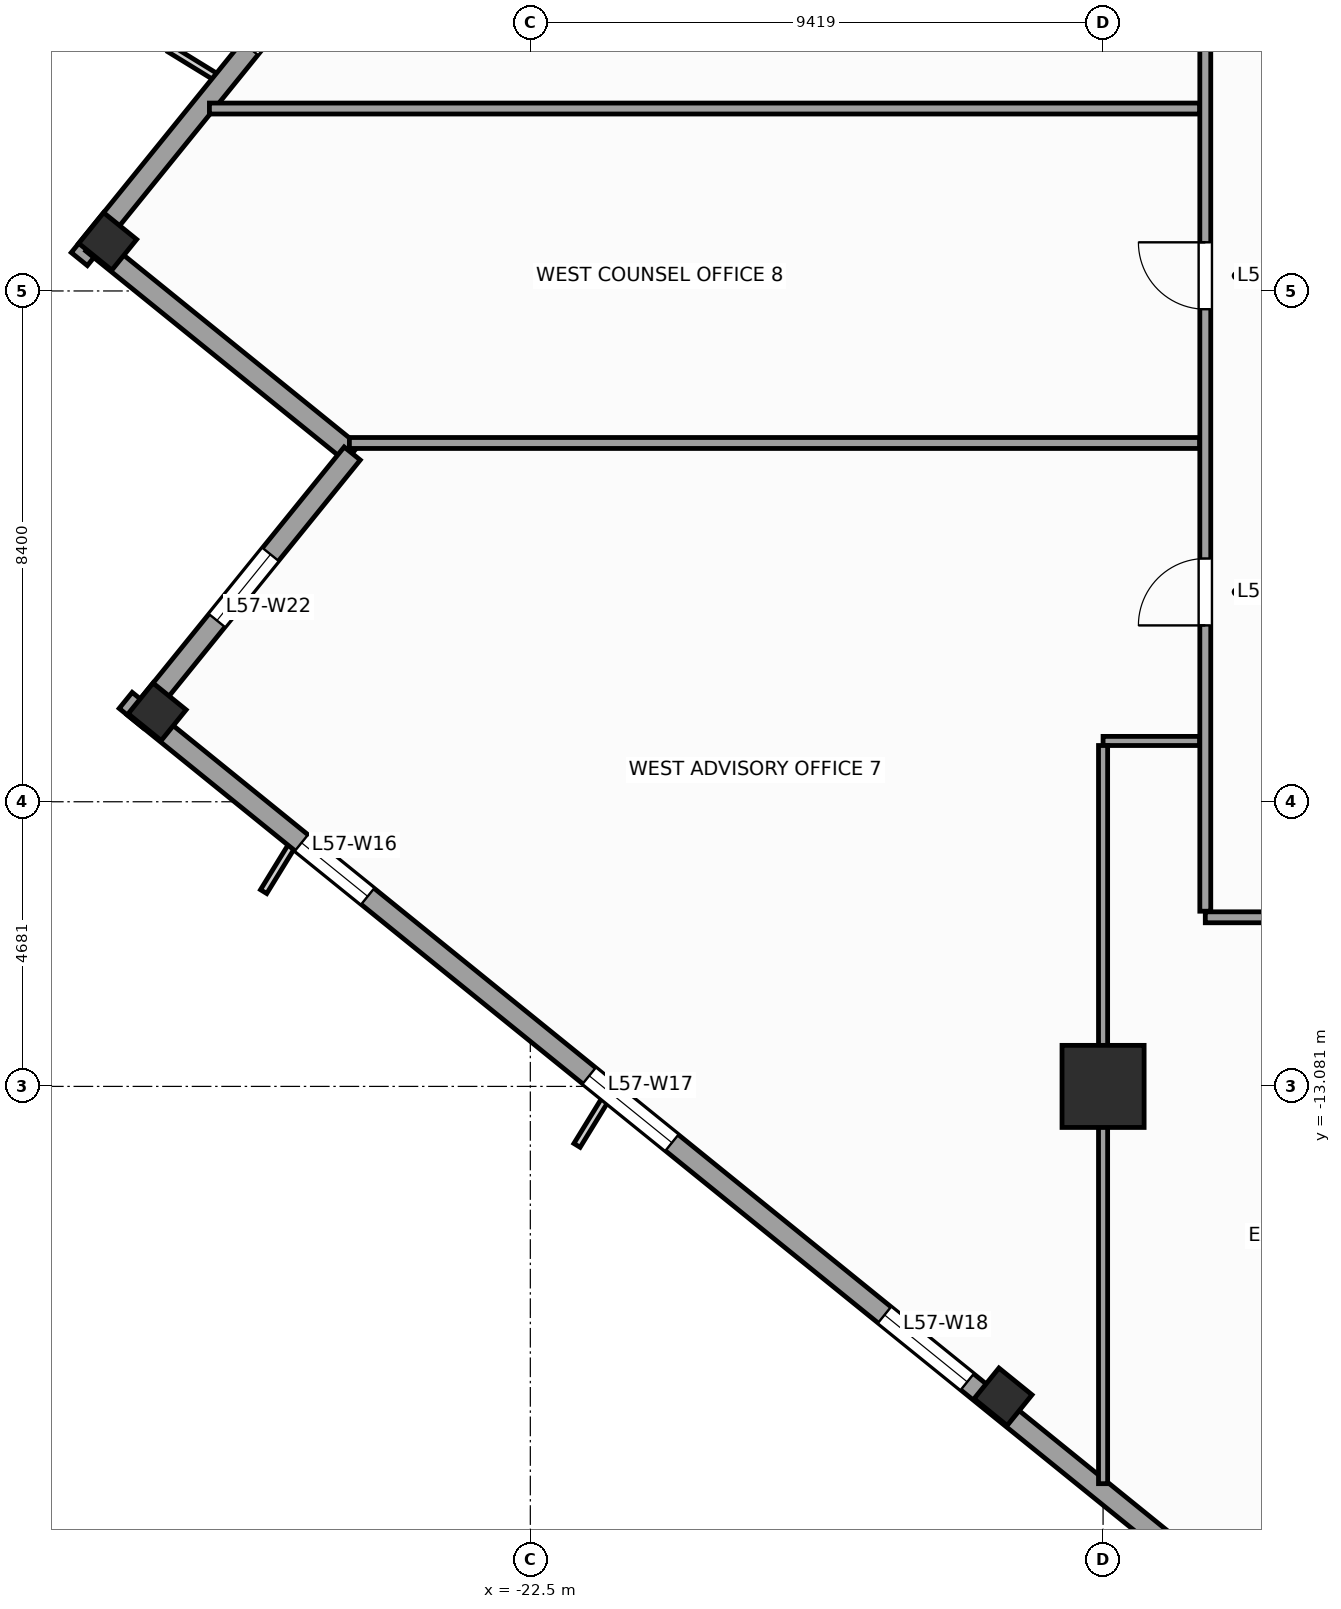
"""IFC4 building model, lengths in metres.
Left out: names, types, materials, properties, quantities, classifications, styles, units other than length and angle.
Written with IfcOpenShell. Run it as: python <this file> out.ifc"""

import sys

from ifc_helpers import new_model, si_unit, direction, frame, frame_2d, origin, origin_2d, place, context, subcontext, project, spatial, rectangle, extrude, source, transform, mapped, element, fill, save


model = new_model("IFC4")
c1 = context("Model", 3, precision=1e-05, world=origin(), true_north=direction((0.0, 1.0)))
c2 = subcontext(c1, "Body", "Model", "MODEL_VIEW")
j1 = project(units=[si_unit("LENGTHUNIT", "METRE"), si_unit("PLANEANGLEUNIT", "RADIAN")], contexts=[c1])
p1 = place(None, origin())
s1 = spatial("IfcSite", under=j1, at=p1, CompositionType="ELEMENT")
p2 = place(p1, origin())
s2 = spatial("IfcBuilding", under=s1, at=p2, CompositionType="ELEMENT")
p3 = place(p2, frame((0.0, 0.0, 236.8)))
s3 = spatial("IfcBuildingStorey", under=s2, at=p3, CompositionType="ELEMENT", Elevation=236.8)
m1 = source(origin(), c2, "Body", "SweptSolid", [
    extrude(rectangle(XDim=1.35, YDim=1.35, at=origin_2d()), origin(), (0.0, 0.0, 1.0), 3.9),
])
p4 = place(p3, frame((-13.081, -13.081, 0.0), z_axis=(0.0, 0.0, 1.0), x_axis=(1.0, 0.0, 0.0)))
e1 = element("IfcColumn", 1, at=p4, inside=s3, PredefinedType="COLUMN", context=c2, shape_type="MappedRepresentation", body=[
    mapped(m1, transform((0.0, 0.0, 0.0), scale=1.0)),
])
m2 = source(origin(), c2, "Body", "SweptSolid", [
    extrude(rectangle(XDim=0.65, YDim=0.7, at=origin_2d()), origin(), (0.0, 0.0, 1.0), 3.9),
])
for number, where, z_axis, x_axis in (
    (2, (-29.45, 0.815, 0.0), (0.0, 0.0, 1.0), (0.629, 0.777, 0.0)),
    (3, (-28.637, -6.92, 0.0), (0.0, 0.0, 1.0), (0.629, 0.777, 0.0)),
    (4, (-14.726, -18.185, 0.0), (0.0, 0.0, 1.0), (0.629, 0.777, 0.0)),
):
    element("IfcColumn", number, at=place(p3, frame(where, z_axis=z_axis, x_axis=x_axis)), inside=s3, PredefinedType="COLUMN", context=c2, shape_type="MappedRepresentation", body=[
        mapped(m2, transform((0.0, 0.0, 0.0), scale=1.0)),
    ])
p5 = place(p3, frame((-6.733, 29.154, 0.0), z_axis=(0.0, 0.0, 1.0), x_axis=(-0.629325378072, -0.77714192302, 0.0)))
e5 = element("IfcWall", 5, at=p5, inside=s3, PredefinedType="STANDARD", context=c2, shape_type="SweptSolid", body=[
    extrude(rectangle(XDim=36.84, YDim=0.34, at=frame_2d((18.42, 0.0))), origin(), (0.0, 0.0, 1.0), 2.96),
])
p6 = place(p5, frame((12.295, 0.0, 0.0)))
e6 = element("IfcOpeningElement", 6, at=p6, cuts=e5, PredefinedType="OPENING", context=c2, shape_type="SweptSolid", body=[
    extrude(rectangle(XDim=1.05, YDim=2.25, at=frame_2d((0.525, 1.125))), frame((0.0, 0.18, 0.0), z_axis=(0.0, -1.0, 0.0), x_axis=(1.0, 0.0, 0.0)), (0.0, 0.0, 1.0), 0.36),
])
p7 = place(p5, frame((3.721, 0.0, 0.48)))
e7 = element("IfcOpeningElement", 7, at=p7, cuts=e5, PredefinedType="OPENING", context=c2, shape_type="SweptSolid", body=[
    extrude(rectangle(XDim=1.4, YDim=2.4, at=frame_2d((0.7, 1.2))), frame((0.0, 0.18, 0.0), z_axis=(0.0, -1.0, 0.0), x_axis=(1.0, 0.0, 0.0)), (0.0, 0.0, 1.0), 0.36),
])
p8 = place(p5, frame((7.559, 0.0, 0.58)))
e8 = element("IfcOpeningElement", 8, at=p8, cuts=e5, PredefinedType="OPENING", context=c2, shape_type="SweptSolid", body=[
    extrude(rectangle(XDim=1.75, YDim=2.3, at=frame_2d((0.875, 1.15))), frame((0.0, 0.18, 0.0), z_axis=(0.0, -1.0, 0.0), x_axis=(1.0, 0.0, 0.0)), (0.0, 0.0, 1.0), 0.36),
])
p9 = place(p5, frame((16.058, 0.0, 0.58)))
e9 = element("IfcOpeningElement", 9, at=p9, cuts=e5, PredefinedType="OPENING", context=c2, shape_type="SweptSolid", body=[
    extrude(rectangle(XDim=1.75, YDim=2.3, at=frame_2d((0.875, 1.15))), frame((0.0, 0.18, 0.0), z_axis=(0.0, -1.0, 0.0), x_axis=(1.0, 0.0, 0.0)), (0.0, 0.0, 1.0), 0.36),
])
p10 = place(p5, frame((24.176, 0.0, 0.58)))
e10 = element("IfcOpeningElement", 10, at=p10, cuts=e5, PredefinedType="OPENING", context=c2, shape_type="SweptSolid", body=[
    extrude(rectangle(XDim=1.75, YDim=2.3, at=frame_2d((0.875, 1.15))), frame((0.0, 0.18, 0.0), z_axis=(0.0, -1.0, 0.0), x_axis=(1.0, 0.0, 0.0)), (0.0, 0.0, 1.0), 0.36),
])
p11 = place(p5, frame((30.982, 0.0, 0.48)))
e11 = element("IfcOpeningElement", 11, at=p11, cuts=e5, PredefinedType="OPENING", context=c2, shape_type="SweptSolid", body=[
    extrude(rectangle(XDim=1.4, YDim=2.4, at=frame_2d((0.7, 1.2))), frame((0.0, 0.18, 0.0), z_axis=(0.0, -1.0, 0.0), x_axis=(1.0, 0.0, 0.0)), (0.0, 0.0, 1.0), 0.36),
])
p12 = place(p3, frame((-29.703, 0.789, 0.0), z_axis=(0.0, 0.0, 1.0), x_axis=(0.77714355312, -0.629323365087, 0.0)))
e12 = element("IfcWall", 12, at=p12, inside=s3, PredefinedType="STANDARD", context=c2, shape_type="SweptSolid", body=[
    extrude(rectangle(XDim=5.5, YDim=0.34, at=frame_2d((2.75, 0.0))), origin(), (0.0, 0.0, 1.0), 3.66),
])
p13 = place(p3, frame((-25.429, -2.673, 0.0), z_axis=(0.0, 0.0, 1.0), x_axis=(-0.629299794138, -0.777162640055, 0.0)))
e13 = element("IfcWall", 13, at=p13, inside=s3, PredefinedType="STANDARD", context=c2, shape_type="SweptSolid", body=[
    extrude(rectangle(XDim=5.67, YDim=0.34, at=frame_2d((2.835, 0.0))), origin(), (0.0, 0.0, 1.0), 3.66),
])
p14 = place(p13, frame((2.135, 0.0, 0.48)))
e14 = element("IfcOpeningElement", 14, at=p14, cuts=e13, PredefinedType="OPENING", context=c2, shape_type="SweptSolid", body=[
    extrude(rectangle(XDim=1.4, YDim=2.4, at=frame_2d((0.7, 1.2))), frame((0.0, 0.18, 0.0), z_axis=(0.0, -1.0, 0.0), x_axis=(1.0, 0.0, 0.0)), (0.0, 0.0, 1.0), 0.36),
])
p15 = place(p3, frame((-29.154, -6.733, 0.0), z_axis=(0.0, 0.0, 1.0), x_axis=(0.77714192302, -0.629325378072, 0.0)))
e15 = element("IfcWall", 15, at=p15, inside=s3, PredefinedType="STANDARD", context=c2, shape_type="SweptSolid", body=[
    extrude(rectangle(XDim=36.84, YDim=0.34, at=frame_2d((18.42, 0.0))), origin(), (0.0, 0.0, 1.0), 2.96),
])
p16 = place(p15, frame((3.721, 0.0, 0.48)))
e16 = element("IfcOpeningElement", 16, at=p16, cuts=e15, PredefinedType="OPENING", context=c2, shape_type="SweptSolid", body=[
    extrude(rectangle(XDim=1.4, YDim=2.4, at=frame_2d((0.7, 1.2))), frame((0.0, 0.18, 0.0), z_axis=(0.0, -1.0, 0.0), x_axis=(1.0, 0.0, 0.0)), (0.0, 0.0, 1.0), 0.36),
])
p17 = place(p15, frame((9.809, 0.0, 0.58)))
e17 = element("IfcOpeningElement", 17, at=p17, cuts=e15, PredefinedType="OPENING", context=c2, shape_type="SweptSolid", body=[
    extrude(rectangle(XDim=1.75, YDim=2.3, at=frame_2d((0.875, 1.15))), frame((0.0, 0.18, 0.0), z_axis=(0.0, -1.0, 0.0), x_axis=(1.0, 0.0, 0.0)), (0.0, 0.0, 1.0), 0.36),
])
p18 = place(p15, frame((16.058, 0.0, 0.58)))
e18 = element("IfcOpeningElement", 18, at=p18, cuts=e15, PredefinedType="OPENING", context=c2, shape_type="SweptSolid", body=[
    extrude(rectangle(XDim=1.75, YDim=2.3, at=frame_2d((0.875, 1.15))), frame((0.0, 0.18, 0.0), z_axis=(0.0, -1.0, 0.0), x_axis=(1.0, 0.0, 0.0)), (0.0, 0.0, 1.0), 0.36),
])
p19 = place(p15, frame((24.176, 0.0, 0.58)))
e19 = element("IfcOpeningElement", 19, at=p19, cuts=e15, PredefinedType="OPENING", context=c2, shape_type="SweptSolid", body=[
    extrude(rectangle(XDim=1.75, YDim=2.3, at=frame_2d((0.875, 1.15))), frame((0.0, 0.18, 0.0), z_axis=(0.0, -1.0, 0.0), x_axis=(1.0, 0.0, 0.0)), (0.0, 0.0, 1.0), 0.36),
])
p20 = place(p15, frame((32.482, 0.0, 0.48)))
e20 = element("IfcOpeningElement", 20, at=p20, cuts=e15, PredefinedType="OPENING", context=c2, shape_type="SweptSolid", body=[
    extrude(rectangle(XDim=1.4, YDim=2.4, at=frame_2d((0.7, 1.2))), frame((0.0, 0.18, 0.0), z_axis=(0.0, -1.0, 0.0), x_axis=(1.0, 0.0, 0.0)), (0.0, 0.0, 1.0), 0.36),
])
p21 = place(p3, frame((-11.4, -10.3, 0.0), z_axis=(0.0, 0.0, 1.0), x_axis=(1.0, 0.0, 0.0)))
e21 = element("IfcWall", 21, at=p21, inside=s3, PredefinedType="PARTITIONING", context=c2, shape_type="SweptSolid", body=[
    extrude(rectangle(XDim=21.7, YDim=0.18, at=frame_2d((10.85, 0.0))), origin(), (0.0, 0.0, 1.0), 3.66),
])
p22 = place(p21, frame((12.989, 0.0, 0.0)))
e22 = element("IfcOpeningElement", 22, at=p22, cuts=e21, PredefinedType="OPENING", context=c2, shape_type="SweptSolid", body=[
    extrude(rectangle(XDim=0.95, YDim=2.1, at=frame_2d((0.475, 1.05))), frame((0.0, 0.1, 0.0), z_axis=(0.0, -1.0, 0.0), x_axis=(1.0, 0.0, 0.0)), (0.0, 0.0, 1.0), 0.2),
])
p23 = place(p21, frame((17.585, 0.0, 0.0)))
e23 = element("IfcOpeningElement", 23, at=p23, cuts=e21, PredefinedType="OPENING", context=c2, shape_type="SweptSolid", body=[
    extrude(rectangle(XDim=1.1, YDim=2.2, at=frame_2d((0.55, 1.1))), frame((0.0, 0.1, 0.0), z_axis=(0.0, -1.0, 0.0), x_axis=(1.0, 0.0, 0.0)), (0.0, 0.0, 1.0), 0.2),
])
p24 = place(p21, frame((9.075, 0.0, 0.0)))
e24 = element("IfcOpeningElement", 24, at=p24, cuts=e21, PredefinedType="OPENING", context=c2, shape_type="SweptSolid", body=[
    extrude(rectangle(XDim=1.1, YDim=2.2, at=frame_2d((0.55, 1.1))), frame((0.0, 0.1, 0.0), z_axis=(0.0, -1.0, 0.0), x_axis=(1.0, 0.0, 0.0)), (0.0, 0.0, 1.0), 0.2),
])
p25 = place(p21, frame((3.724, 0.0, 0.0)))
e25 = element("IfcOpeningElement", 25, at=p25, cuts=e21, PredefinedType="OPENING", context=c2, shape_type="SweptSolid", body=[
    extrude(rectangle(XDim=1.1, YDim=2.2, at=frame_2d((0.55, 1.1))), frame((0.0, 0.1, 0.0), z_axis=(0.0, -1.0, 0.0), x_axis=(1.0, 0.0, 0.0)), (0.0, 0.0, 1.0), 0.2),
])
p26 = place(p3, frame((-11.4, -10.2, 0.0), z_axis=(0.0, 0.0, 1.0), x_axis=(0.0, 1.0, 0.0)))
e26 = element("IfcWall", 26, at=p26, inside=s3, PredefinedType="PARTITIONING", context=c2, shape_type="SweptSolid", body=[
    extrude(rectangle(XDim=20.4, YDim=0.18, at=frame_2d((10.2, 0.0))), origin(), (0.0, 0.0, 1.0), 3.66),
])
p27 = place(p26, frame((14.85, 0.0, 0.0)))
e27 = element("IfcOpeningElement", 27, at=p27, cuts=e26, PredefinedType="OPENING", context=c2, shape_type="SweptSolid", body=[
    extrude(rectangle(XDim=1.1, YDim=2.2, at=frame_2d((0.55, 1.1))), frame((0.0, 0.1, 0.0), z_axis=(0.0, -1.0, 0.0), x_axis=(1.0, 0.0, 0.0)), (0.0, 0.0, 1.0), 0.2),
])
p28 = place(p26, frame((4.7, 0.0, 0.0)))
e28 = element("IfcOpeningElement", 28, at=p28, cuts=e26, PredefinedType="OPENING", context=c2, shape_type="SweptSolid", body=[
    extrude(rectangle(XDim=1.1, YDim=2.2, at=frame_2d((0.55, 1.1))), frame((0.0, 0.1, 0.0), z_axis=(0.0, -1.0, 0.0), x_axis=(1.0, 0.0, 0.0)), (0.0, 0.0, 1.0), 0.2),
])
p29 = place(p26, frame((9.9, 0.0, 0.0)))
e29 = element("IfcOpeningElement", 29, at=p29, cuts=e26, PredefinedType="OPENING", context=c2, shape_type="SweptSolid", body=[
    extrude(rectangle(XDim=1.1, YDim=2.2, at=frame_2d((0.55, 1.1))), frame((0.0, 0.1, 0.0), z_axis=(0.0, -1.0, 0.0), x_axis=(1.0, 0.0, 0.0)), (0.0, 0.0, 1.0), 0.2),
])
p30 = place(p3, frame((-11.495, -2.5, 0.0), z_axis=(0.0, 0.0, 1.0), x_axis=(-1.0, 0.0, 0.0)))
e30 = element("IfcWall", 30, at=p30, inside=s3, PredefinedType="PARTITIONING", context=c2, shape_type="SweptSolid", body=[
    extrude(rectangle(XDim=13.98, YDim=0.18, at=frame_2d((6.99, 0.0))), origin(), (0.0, 0.0, 1.0), 3.66),
])
p31 = place(p3, frame((-11.495, 3.0, 0.0), z_axis=(0.0, 0.0, 1.0), x_axis=(-1.0, 0.0, 0.0)))
e31 = element("IfcWall", 31, at=p31, inside=s3, PredefinedType="PARTITIONING", context=c2, shape_type="SweptSolid", body=[
    extrude(rectangle(XDim=16.282, YDim=0.18, at=frame_2d((8.141, 0.0))), origin(), (0.0, 0.0, 1.0), 3.66),
])
p32 = place(p3, frame((-11.495, -7.4, 0.0), z_axis=(0.0, 0.0, 1.0), x_axis=(-1.0, 0.0, 0.0)))
e32 = element("IfcWall", 32, at=p32, inside=s3, PredefinedType="PARTITIONING", context=c2, shape_type="SweptSolid", body=[
    extrude(rectangle(XDim=1.586, YDim=0.15, at=frame_2d((0.793, 0.0))), origin(), (0.0, 0.0, 1.0), 3.66),
])
p33 = place(p3, frame((-13.081, -7.475, 0.0), z_axis=(0.0, 0.0, 1.0), x_axis=(0.0, -1.0, 0.0)))
e33 = element("IfcWall", 33, at=p33, inside=s3, PredefinedType="PARTITIONING", context=c2, shape_type="SweptSolid", body=[
    extrude(rectangle(XDim=12.139, YDim=0.15, at=frame_2d((6.069, 0.0))), origin(), (0.0, 0.0, 1.0), 2.76),
])
m3 = source(origin(), c2, "Body", "SweptSolid", [
    extrude(rectangle(XDim=1.4, YDim=2.4, at=frame_2d((0.7, 1.2))), frame((0.0, 0.03, 0.0), z_axis=(0.0, -1.0, 0.0), x_axis=(1.0, 0.0, 0.0)), (0.0, 0.0, 1.0), 0.06),
])
p34 = place(p16, origin())
e34 = element("IfcWindow", 34, at=p34, inside=s3, PartitioningType="SINGLE_PANEL", PredefinedType="WINDOW", context=c2, shape_type="MappedRepresentation", body=[
    mapped(m3, transform((0.0, 0.0, 0.0), scale=1.0)),
])
fill(e16, e34)
m4 = source(origin(), c2, "Body", "SweptSolid", [
    extrude(rectangle(XDim=1.75, YDim=2.3, at=frame_2d((0.875, 1.15))), frame((0.0, 0.03, 0.0), z_axis=(0.0, -1.0, 0.0), x_axis=(1.0, 0.0, 0.0)), (0.0, 0.0, 1.0), 0.06),
])
p35 = place(p17, origin())
e35 = element("IfcWindow", 35, at=p35, inside=s3, PartitioningType="SINGLE_PANEL", PredefinedType="WINDOW", context=c2, shape_type="MappedRepresentation", body=[
    mapped(m4, transform((0.0, 0.0, 0.0), scale=1.0)),
])
fill(e17, e35)
p36 = place(p18, origin())
e36 = element("IfcWindow", 36, at=p36, inside=s3, PartitioningType="SINGLE_PANEL", PredefinedType="WINDOW", context=c2, shape_type="MappedRepresentation", body=[
    mapped(m4, transform((0.0, 0.0, 0.0), scale=1.0)),
])
fill(e18, e36)
p37 = place(p14, origin())
e37 = element("IfcWindow", 37, at=p37, inside=s3, PartitioningType="SINGLE_PANEL", PredefinedType="WINDOW", context=c2, shape_type="MappedRepresentation", body=[
    mapped(m3, transform((0.0, 0.0, 0.0), scale=1.0)),
])
fill(e14, e37)
m5 = source(origin(), c2, "Body", "SweptSolid", [
    extrude(rectangle(XDim=1.1, YDim=2.2, at=frame_2d((0.55, 1.1))), frame((0.0, 0.025, 0.0), z_axis=(0.0, -1.0, 0.0), x_axis=(1.0, 0.0, 0.0)), (0.0, 0.0, 1.0), 0.05),
])
p38 = place(p28, origin())
e38 = element("IfcDoor", 38, at=p38, inside=s3, OperationType="SINGLE_SWING_LEFT", PredefinedType="DOOR", context=c2, shape_type="MappedRepresentation", body=[
    mapped(m5, transform((0.0, 0.0, 0.0), scale=1.0)),
])
fill(e28, e38)
p39 = place(p29, origin())
e39 = element("IfcDoor", 39, at=p39, inside=s3, OperationType="SINGLE_SWING_RIGHT", PredefinedType="DOOR", context=c2, shape_type="MappedRepresentation", body=[
    mapped(m5, transform((0.0, 0.0, 0.0), scale=1.0)),
])
fill(e29, e39)
save(model, sys.argv[1])
